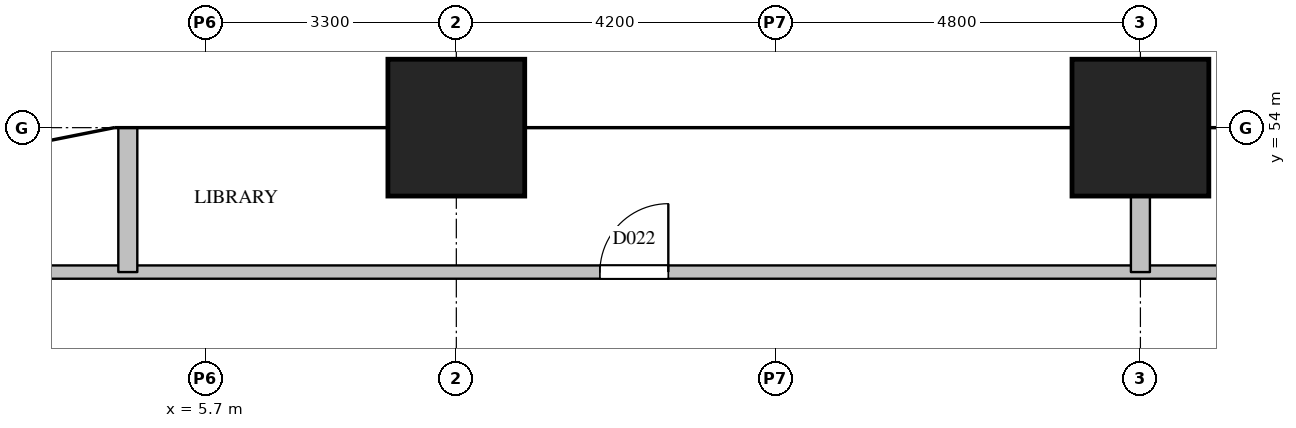
"""IFC4 building model, lengths in metres.
Left out: names, types, materials, properties, quantities, classifications, styles, units other than length and angle.
Written with IfcOpenShell. Run it as: python <this file> out.ifc"""

import sys

from ifc_helpers import new_model, si_unit, direction, frame, frame_2d, origin, origin_2d, place, context, subcontext, project, spatial, rectangle, extrude, element, fill, save


model = new_model("IFC4")
c1 = context("Model", 3, precision=1e-05, world=origin(), true_north=direction((0.0, 1.0)))
c2 = subcontext(c1, "Body", "Model", "MODEL_VIEW")
j1 = project(units=[si_unit("LENGTHUNIT", "METRE"), si_unit("PLANEANGLEUNIT", "RADIAN")], contexts=[c1])
p1 = place(None, origin())
s1 = spatial("IfcSite", under=j1, at=p1, CompositionType="ELEMENT")
p2 = place(p1, origin())
s2 = spatial("IfcBuilding", under=s1, at=p2, CompositionType="ELEMENT")
p3 = place(p2, frame((0.0, 0.0, 93.0)))
s3 = spatial("IfcBuildingStorey", under=s2, at=p3, CompositionType="ELEMENT", Elevation=93.0)
for number, where, z_axis, x_axis in (
    (1, (9.0, 54.0, 0.0), (0.0, 0.0, 1.0), (1.0, 0.0, 0.0)),
    (2, (18.0, 54.0, 0.0), (0.0, 0.0, 1.0), (1.0, 0.0, 0.0)),
):
    element("IfcColumn", number, at=place(p3, frame(where, z_axis=z_axis, x_axis=x_axis)), inside=s3, PredefinedType="COLUMN", context=c2, shape_type="SweptSolid", body=[
        extrude(rectangle(XDim=1.8, YDim=1.8, at=origin_2d()), origin(), (0.0, 0.0, 1.0), 3.8),
    ])
p4 = place(p3, frame((3.5, 52.1, 0.0), z_axis=(0.0, 0.0, 1.0), x_axis=(1.0, 0.0, 0.0)))
e3 = element("IfcWall", 3, at=p4, inside=s3, PredefinedType="PARTITIONING", context=c2, shape_type="SweptSolid", body=[
    extrude(rectangle(XDim=16.6, YDim=0.175, at=frame_2d((8.3, 0.0))), origin(), (0.0, 0.0, 1.0), 3.5),
])
p5 = place(p4, frame((7.389, 0.0, 0.0)))
e4 = element("IfcOpeningElement", 4, at=p5, cuts=e3, PredefinedType="OPENING", context=c2, shape_type="SweptSolid", body=[
    extrude(rectangle(XDim=0.9, YDim=2.1, at=frame_2d((0.45, 1.05))), frame((0.0, 0.097, 0.0), z_axis=(0.0, -1.0, 0.0), x_axis=(1.0, 0.0, 0.0)), (0.0, 0.0, 1.0), 0.195),
])
p6 = place(p3, frame((4.678, 52.1, 0.0), z_axis=(0.0, 0.0, 1.0), x_axis=(0.0, 1.0, 0.0)))
e5 = element("IfcWall", 5, at=p6, inside=s3, PredefinedType="PARTITIONING", context=c2, shape_type="SweptSolid", body=[
    extrude(rectangle(XDim=1.9, YDim=0.25, at=frame_2d((0.95, 0.0))), origin(), (0.0, 0.0, 1.0), 2.5),
])
p7 = place(p3, frame((18.0, 52.1, 0.0), z_axis=(0.0, 0.0, 1.0), x_axis=(0.0, 1.0, 0.0)))
e6 = element("IfcWall", 6, at=p7, inside=s3, PredefinedType="PARTITIONING", context=c2, shape_type="SweptSolid", body=[
    extrude(rectangle(XDim=1.9, YDim=0.25, at=frame_2d((0.95, 0.0))), origin(), (0.0, 0.0, 1.0), 3.5),
])
p8 = place(p5, origin())
e7 = element("IfcDoor", 7, at=p8, inside=s3, OperationType="SINGLE_SWING_RIGHT", PredefinedType="DOOR", context=c2, shape_type="SweptSolid", body=[
    extrude(rectangle(XDim=0.9, YDim=2.1, at=frame_2d((0.45, 1.05))), frame((0.0, 0.025, 0.0), z_axis=(0.0, -1.0, 0.0), x_axis=(1.0, 0.0, 0.0)), (0.0, 0.0, 1.0), 0.05),
])
fill(e4, e7)
save(model, sys.argv[1])
